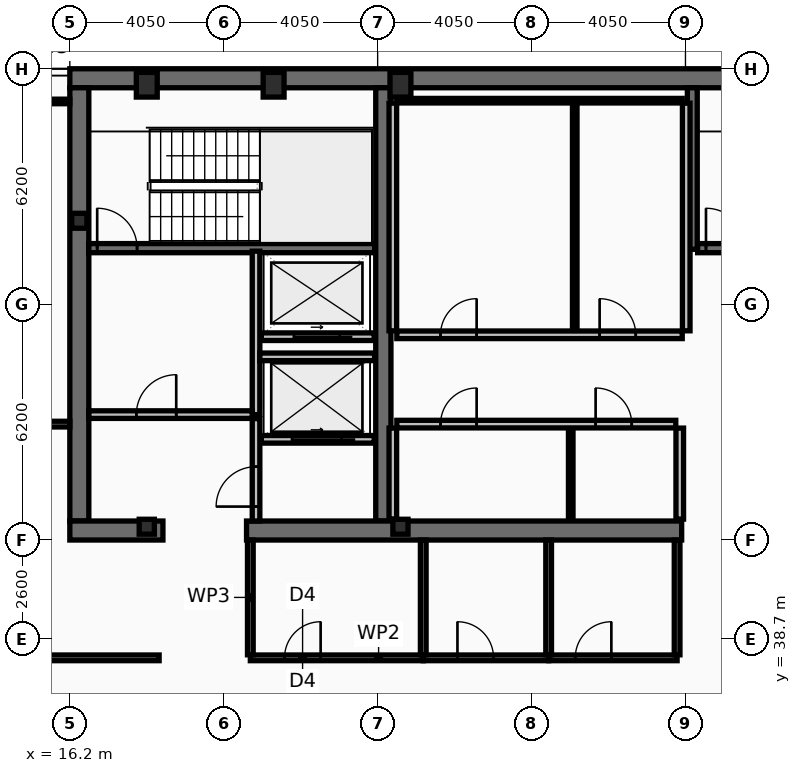
"""IFC4 building model, lengths in metres.
Left out: names, types, materials, properties, quantities, classifications, styles, units other than length and angle.
Written with IfcOpenShell. Run it as: python <this file> out.ifc"""

import sys

from ifc_helpers import new_model, si_unit, direction, frame, frame_2d, origin, origin_2d, place, context, subcontext, project, spatial, rectangle, hollow_rectangle, i_section, extrude, element, fill, save


model = new_model("IFC4")
c1 = context("Model", 3, precision=1e-05, world=origin(), true_north=direction((0.0, 1.0)))
c2 = subcontext(c1, "Body", "Model", "MODEL_VIEW")
j1 = project(units=[si_unit("LENGTHUNIT", "METRE"), si_unit("PLANEANGLEUNIT", "RADIAN")], contexts=[c1])
p1 = place(None, origin())
s1 = spatial("IfcSite", under=j1, at=p1, CompositionType="ELEMENT")
p2 = place(p1, origin())
s2 = spatial("IfcBuilding", under=s1, at=p2, CompositionType="ELEMENT")
p3 = place(p2, frame((0.0, 0.0, 329.0)))
s3 = spatial("IfcBuildingStorey", under=s2, at=p3, CompositionType="ELEMENT", Elevation=329.0)
p4 = place(p3, frame((16.2, 53.45, 0.0), z_axis=(0.0, 0.0, 1.0), x_axis=(1.0, 0.0, 0.0)))
e1 = element("IfcWall", 1, at=p4, inside=s3, PredefinedType="SHEAR", context=c2, shape_type="SweptSolid", body=[
    extrude(rectangle(XDim=40.5, YDim=0.5, at=frame_2d((20.25, 0.0))), origin(), (0.0, 0.0, 1.0), 3.44),
])
p5 = place(p3, frame((16.45, 41.8, 0.0), z_axis=(0.0, 0.0, 1.0), x_axis=(0.0, 1.0, 0.0)))
e2 = element("IfcWall", 2, at=p5, inside=s3, PredefinedType="SHEAR", context=c2, shape_type="SweptSolid", body=[
    extrude(rectangle(XDim=11.4, YDim=0.5, at=frame_2d((5.7, 0.0))), origin(), (0.0, 0.0, 1.0), 3.44),
])
p6 = place(p3, frame((24.45, 41.8, 0.0), z_axis=(0.0, 0.0, 1.0), x_axis=(0.0, 1.0, 0.0)))
e3 = element("IfcWall", 3, at=p6, inside=s3, PredefinedType="SHEAR", context=c2, shape_type="SweptSolid", body=[
    extrude(rectangle(XDim=11.4, YDim=0.4, at=frame_2d((5.7, 0.0))), origin(), (0.0, 0.0, 1.0), 3.44),
])
p7 = place(p3, frame((18.65, 41.55, 0.0), z_axis=(0.0, 0.0, 1.0), x_axis=(-1.0, 0.0, 0.0)))
e4 = element("IfcWall", 4, at=p7, inside=s3, PredefinedType="SHEAR", context=c2, shape_type="SweptSolid", body=[
    extrude(rectangle(XDim=2.45, YDim=0.5, at=frame_2d((1.225, 0.0))), origin(), (0.0, 0.0, 1.0), 3.44),
])
p8 = place(p3, frame((32.3, 41.55, 0.0), z_axis=(0.0, 0.0, 1.0), x_axis=(-1.0, 0.0, 0.0)))
e5 = element("IfcWall", 5, at=p8, inside=s3, PredefinedType="SHEAR", context=c2, shape_type="SweptSolid", body=[
    extrude(rectangle(XDim=11.45, YDim=0.5, at=frame_2d((5.725, 0.0))), origin(), (0.0, 0.0, 1.0), 3.44),
])
p9 = place(p3, frame((32.58, 48.95, 0.0), z_axis=(0.0, 0.0, 1.0), x_axis=(0.0, 1.0, 0.0)))
e6 = element("IfcWall", 6, at=p9, inside=s3, PredefinedType="SHEAR", context=c2, shape_type="SweptSolid", body=[
    extrude(rectangle(XDim=4.25, YDim=0.26, at=frame_2d((2.125, 0.0))), origin(), (0.0, 0.0, 1.0), 3.44),
])
p10 = place(p3, frame((16.7, 48.98, 0.0), z_axis=(0.0, 0.0, 1.0), x_axis=(1.0, 0.0, 0.0)))
e7 = element("IfcWall", 7, at=p10, inside=s3, PredefinedType="SHEAR", context=c2, shape_type="SweptSolid", body=[
    extrude(rectangle(XDim=7.52, YDim=0.24, at=frame_2d((3.76, 0.0))), origin(), (0.0, 0.0, 1.0), 3.44),
])
p11 = place(p10, frame((0.22, 0.0, 0.0)))
e8 = element("IfcOpeningElement", 8, at=p11, cuts=e7, PredefinedType="OPENING", context=c2, shape_type="SweptSolid", body=[
    extrude(rectangle(XDim=1.05, YDim=2.15, at=frame_2d((0.525, 1.075))), frame((0.0, 0.13, 0.0), z_axis=(0.0, -1.0, 0.0), x_axis=(1.0, 0.0, 0.0)), (0.0, 0.0, 1.0), 0.26),
])
p12 = place(p3, frame((32.72, 48.98, 0.0), z_axis=(0.0, 0.0, 1.0), x_axis=(1.0, 0.0, 0.0)))
e9 = element("IfcWall", 9, at=p12, inside=s3, PredefinedType="SHEAR", context=c2, shape_type="SweptSolid", body=[
    extrude(rectangle(XDim=7.56, YDim=0.24, at=frame_2d((3.78, 0.0))), origin(), (0.0, 0.0, 1.0), 3.44),
])
p13 = place(p12, frame((0.22, 0.0, 0.0)))
e10 = element("IfcOpeningElement", 10, at=p13, cuts=e9, PredefinedType="OPENING", context=c2, shape_type="SweptSolid", body=[
    extrude(rectangle(XDim=1.05, YDim=2.15, at=frame_2d((0.525, 1.075))), frame((0.0, 0.13, 0.0), z_axis=(0.0, -1.0, 0.0), x_axis=(1.0, 0.0, 0.0)), (0.0, 0.0, 1.0), 0.26),
])
for number, where, z_axis, x_axis in (
    (11, (18.225, 53.28, 0.0), (0.0, 0.0, 1.0), (1.0, 0.0, 0.0)),
    (12, (21.562, 53.28, 0.0), (0.0, 0.0, 1.0), (1.0, 0.0, 0.0)),
    (13, (24.9, 53.28, 0.0), (0.0, 0.0, 1.0), (1.0, 0.0, 0.0)),
):
    element("IfcColumn", number, at=place(p3, frame(where, z_axis=z_axis, x_axis=x_axis)), inside=s3, PredefinedType="COLUMN", context=c2, shape_type="SweptSolid", body=[
        extrude(hollow_rectangle(XDim=0.55, YDim=0.65, WallThickness=0.04, at=origin_2d()), origin(), (0.0, 0.0, 1.0), 3.6),
    ])
for number, where, z_axis, x_axis in (
    (14, (16.45, 49.7, 0.0), (0.0, 0.0, 1.0), (1.0, 0.0, 0.0)),
    (15, (18.225, 41.65, 0.0), (0.0, 0.0, 1.0), (1.0, 0.0, 0.0)),
    (16, (24.9, 41.65, 0.0), (0.0, 0.0, 1.0), (1.0, 0.0, 0.0)),
):
    element("IfcColumn", number, at=place(p3, frame(where, z_axis=z_axis, x_axis=x_axis)), inside=s3, PredefinedType="COLUMN", context=c2, shape_type="SweptSolid", body=[
        extrude(i_section(OverallWidth=0.399, OverallDepth=0.393, WebThickness=0.023, FlangeThickness=0.037, at=origin_2d()), origin(), (0.0, 0.0, 1.0), 3.6),
    ])
p14 = place(p3, frame((24.21, 43.95, 0.0), z_axis=(0.0, 0.0, 1.0), x_axis=(-1.0, 0.0, 0.0)))
e17 = element("IfcWall", 17, at=p14, inside=s3, PredefinedType="PARTITIONING", context=c2, shape_type="SweptSolid", body=[
    extrude(rectangle(XDim=2.97, YDim=0.2, at=frame_2d((1.485, 0.0))), origin(), (0.0, 0.0, 1.0), 3.44),
])
p15 = place(p14, frame((0.86, 0.0, 0.0)))
e18 = element("IfcOpeningElement", 18, at=p15, cuts=e17, PredefinedType="OPENING", context=c2, shape_type="SweptSolid", body=[
    extrude(rectangle(XDim=1.3, YDim=2.18, at=frame_2d((0.65, 1.09))), frame((0.0, 0.11, 0.0), z_axis=(0.0, -1.0, 0.0), x_axis=(1.0, 0.0, 0.0)), (0.0, 0.0, 1.0), 0.22),
])
p16 = place(p3, frame((24.21, 46.65, 0.0), z_axis=(0.0, 0.0, 1.0), x_axis=(-1.0, 0.0, 0.0)))
e19 = element("IfcWall", 19, at=p16, inside=s3, PredefinedType="PARTITIONING", context=c2, shape_type="SweptSolid", body=[
    extrude(rectangle(XDim=2.97, YDim=0.2, at=frame_2d((1.485, 0.0))), origin(), (0.0, 0.0, 1.0), 3.44),
])
p17 = place(p16, frame((0.91, 0.0, 0.0)))
e20 = element("IfcOpeningElement", 20, at=p17, cuts=e19, PredefinedType="OPENING", context=c2, shape_type="SweptSolid", body=[
    extrude(rectangle(XDim=1.2, YDim=2.18, at=frame_2d((0.6, 1.09))), frame((0.0, 0.11, 0.0), z_axis=(0.0, -1.0, 0.0), x_axis=(1.0, 0.0, 0.0)), (0.0, 0.0, 1.0), 0.22),
])
p18 = place(p3, frame((21.1, 44.6, 0.0), z_axis=(0.0, 0.0, 1.0), x_axis=(0.0, 1.0, 0.0)))
e21 = element("IfcWall", 21, at=p18, inside=s3, PredefinedType="PARTITIONING", context=c2, shape_type="SweptSolid", body=[
    extrude(rectangle(XDim=4.3, YDim=0.2, at=frame_2d((2.15, 0.0))), origin(), (0.0, 0.0, 1.0), 3.44),
])
p19 = place(p3, frame((16.7, 44.6, 0.0), z_axis=(0.0, 0.0, 1.0), x_axis=(1.0, 0.0, 0.0)))
e22 = element("IfcWall", 22, at=p19, inside=s3, PredefinedType="PARTITIONING", context=c2, shape_type="SweptSolid", body=[
    extrude(rectangle(XDim=4.3, YDim=0.2, at=frame_2d((2.15, 0.0))), origin(), (0.0, 0.0, 1.0), 3.44),
])
p20 = place(p19, frame((1.25, 0.0, 0.0)))
e23 = element("IfcOpeningElement", 23, at=p20, cuts=e22, PredefinedType="OPENING", context=c2, shape_type="SweptSolid", body=[
    extrude(rectangle(XDim=1.05, YDim=2.15, at=frame_2d((0.525, 1.075))), frame((0.0, 0.11, 0.0), z_axis=(0.0, -1.0, 0.0), x_axis=(1.0, 0.0, 0.0)), (0.0, 0.0, 1.0), 0.22),
])
p21 = place(p3, frame((21.2, 46.12, 0.0), z_axis=(0.0, 0.0, 1.0), x_axis=(1.0, 0.0, 0.0)))
e24 = element("IfcWall", 24, at=p21, inside=s3, PredefinedType="PARTITIONING", context=c2, shape_type="SweptSolid", body=[
    extrude(rectangle(XDim=3.02, YDim=0.2, at=frame_2d((1.51, 0.0))), origin(), (0.0, 0.0, 1.0), 3.44),
])
p22 = place(p3, frame((21.1, 41.8, 0.0), z_axis=(0.0, 0.0, 1.0), x_axis=(0.0, 1.0, 0.0)))
e25 = element("IfcWall", 25, at=p22, inside=s3, PredefinedType="PARTITIONING", context=c2, shape_type="SweptSolid", body=[
    extrude(rectangle(XDim=2.695, YDim=0.2, at=frame_2d((1.348, 0.0))), origin(), (0.0, 0.0, 1.0), 3.44),
])
p23 = place(p22, frame((0.38, 0.0, 0.0)))
e26 = element("IfcOpeningElement", 26, at=p23, cuts=e25, PredefinedType="OPENING", context=c2, shape_type="SweptSolid", body=[
    extrude(rectangle(XDim=1.05, YDim=2.15, at=frame_2d((0.525, 1.075))), frame((0.0, 0.11, 0.0), z_axis=(0.0, -1.0, 0.0), x_axis=(1.0, 0.0, 0.0)), (0.0, 0.0, 1.0), 0.22),
])
for number, where, z_axis, x_axis in (
    (27, (24.7, 46.805, 0.0), (0.0, 0.0, 1.0), (0.0, 1.0, 0.0)),
    (28, (32.42, 46.805, 0.0), (0.0, 0.0, 1.0), (0.0, 1.0, 0.0)),
):
    element("IfcWall", number, at=place(p3, frame(where, z_axis=z_axis, x_axis=x_axis)), inside=s3, PredefinedType="PARTITIONING", context=c2, shape_type="SweptSolid", body=[
        extrude(rectangle(XDim=5.99, YDim=0.2, at=frame_2d((2.995, 0.0))), origin(), (0.0, 0.0, 1.0), 3.44),
    ])
p24 = place(p3, frame((24.805, 52.86, 0.0), z_axis=(0.0, 0.0, 1.0), x_axis=(1.0, 0.0, 0.0)))
e29 = element("IfcWall", 29, at=p24, inside=s3, PredefinedType="PARTITIONING", context=c2, shape_type="SweptSolid", body=[
    extrude(rectangle(XDim=7.51, YDim=0.12, at=frame_2d((3.755, 0.0))), origin(), (0.0, 0.0, 1.0), 3.44),
])
p25 = place(p3, frame((29.486, 46.805, 0.0), z_axis=(0.0, 0.0, 1.0), x_axis=(0.0, 1.0, 0.0)))
e30 = element("IfcWall", 30, at=p25, inside=s3, PredefinedType="PARTITIONING", context=c2, shape_type="SweptSolid", body=[
    extrude(rectangle(XDim=5.99, YDim=0.12, at=frame_2d((2.995, 0.0))), origin(), (0.0, 0.0, 1.0), 3.44),
])
p26 = place(p3, frame((24.805, 46.7, 0.0), z_axis=(0.0, 0.0, 1.0), x_axis=(1.0, 0.0, 0.0)))
e31 = element("IfcWall", 31, at=p26, inside=s3, PredefinedType="PARTITIONING", context=c2, shape_type="SweptSolid", body=[
    extrude(rectangle(XDim=7.51, YDim=0.2, at=frame_2d((3.755, 0.0))), origin(), (0.0, 0.0, 1.0), 3.44),
])
p27 = place(p26, frame((1.15, 0.0, 0.0)))
e32 = element("IfcOpeningElement", 32, at=p27, cuts=e31, PredefinedType="OPENING", context=c2, shape_type="SweptSolid", body=[
    extrude(rectangle(XDim=0.95, YDim=2.1, at=frame_2d((0.475, 1.05))), frame((0.0, 0.11, 0.0), z_axis=(0.0, -1.0, 0.0), x_axis=(1.0, 0.0, 0.0)), (0.0, 0.0, 1.0), 0.22),
])
p28 = place(p26, frame((5.336, 0.0, 0.0)))
e33 = element("IfcOpeningElement", 33, at=p28, cuts=e31, PredefinedType="OPENING", context=c2, shape_type="SweptSolid", body=[
    extrude(rectangle(XDim=0.95, YDim=2.1, at=frame_2d((0.475, 1.05))), frame((0.0, 0.11, 0.0), z_axis=(0.0, -1.0, 0.0), x_axis=(1.0, 0.0, 0.0)), (0.0, 0.0, 1.0), 0.22),
])
for number, where, z_axis, x_axis in (
    (34, (24.7, 41.85, 0.0), (0.0, 0.0, 1.0), (0.0, 1.0, 0.0)),
    (35, (32.25, 41.85, 0.0), (0.0, 0.0, 1.0), (0.0, 1.0, 0.0)),
):
    element("IfcWall", number, at=place(p3, frame(where, z_axis=z_axis, x_axis=x_axis)), inside=s3, PredefinedType="PARTITIONING", context=c2, shape_type="SweptSolid", body=[
        extrude(rectangle(XDim=2.395, YDim=0.2, at=frame_2d((1.198, 0.0))), origin(), (0.0, 0.0, 1.0), 3.44),
    ])
p29 = place(p3, frame((29.381, 41.85, 0.0), z_axis=(0.0, 0.0, 1.0), x_axis=(0.0, 1.0, 0.0)))
e36 = element("IfcWall", 36, at=p29, inside=s3, PredefinedType="PARTITIONING", context=c2, shape_type="SweptSolid", body=[
    extrude(rectangle(XDim=2.395, YDim=0.12, at=frame_2d((1.198, 0.0))), origin(), (0.0, 0.0, 1.0), 3.44),
])
p30 = place(p3, frame((24.805, 44.35, 0.0), z_axis=(0.0, 0.0, 1.0), x_axis=(1.0, 0.0, 0.0)))
e37 = element("IfcWall", 37, at=p30, inside=s3, PredefinedType="PARTITIONING", context=c2, shape_type="SweptSolid", body=[
    extrude(rectangle(XDim=7.34, YDim=0.2, at=frame_2d((3.67, 0.0))), origin(), (0.0, 0.0, 1.0), 3.44),
])
p31 = place(p30, frame((1.15, 0.0, 0.0)))
e38 = element("IfcOpeningElement", 38, at=p31, cuts=e37, PredefinedType="OPENING", context=c2, shape_type="SweptSolid", body=[
    extrude(rectangle(XDim=0.95, YDim=2.1, at=frame_2d((0.475, 1.05))), frame((0.0, 0.11, 0.0), z_axis=(0.0, -1.0, 0.0), x_axis=(1.0, 0.0, 0.0)), (0.0, 0.0, 1.0), 0.22),
])
p32 = place(p30, frame((5.231, 0.0, 0.0)))
e39 = element("IfcOpeningElement", 39, at=p32, cuts=e37, PredefinedType="OPENING", context=c2, shape_type="SweptSolid", body=[
    extrude(rectangle(XDim=0.95, YDim=2.1, at=frame_2d((0.475, 1.05))), frame((0.0, 0.11, 0.0), z_axis=(0.0, -1.0, 0.0), x_axis=(1.0, 0.0, 0.0)), (0.0, 0.0, 1.0), 0.22),
])
p33 = place(p3, frame((20.95, 38.2, 0.0), z_axis=(0.0, 0.0, 1.0), x_axis=(1.0, 0.0, 0.0)))
e40 = element("IfcWall", 40, at=p33, inside=s3, PredefinedType="PARTITIONING", context=c2, shape_type="SweptSolid", body=[
    extrude(rectangle(XDim=4.55, YDim=0.15, at=frame_2d((2.275, 0.0))), origin(), (0.0, 0.0, 1.0), 2.83),
])
p34 = place(p33, frame((0.9, 0.0, 0.0)))
e41 = element("IfcOpeningElement", 41, at=p34, cuts=e40, PredefinedType="OPENING", context=c2, shape_type="SweptSolid", body=[
    extrude(rectangle(XDim=0.95, YDim=2.05, at=frame_2d((0.475, 1.025))), frame((0.0, 0.085, 0.0), z_axis=(0.0, -1.0, 0.0), x_axis=(1.0, 0.0, 0.0)), (0.0, 0.0, 1.0), 0.17),
])
p35 = place(p3, frame((25.5, 38.2, 0.0), z_axis=(0.0, 0.0, 1.0), x_axis=(1.0, 0.0, 0.0)))
e42 = element("IfcWall", 42, at=p35, inside=s3, PredefinedType="PARTITIONING", context=c2, shape_type="SweptSolid", body=[
    extrude(rectangle(XDim=3.3, YDim=0.15, at=frame_2d((1.65, 0.0))), origin(), (0.0, 0.0, 1.0), 3.44),
])
p36 = place(p35, frame((0.9, 0.0, 0.0)))
e43 = element("IfcOpeningElement", 43, at=p36, cuts=e42, PredefinedType="OPENING", context=c2, shape_type="SweptSolid", body=[
    extrude(rectangle(XDim=0.95, YDim=2.05, at=frame_2d((0.475, 1.025))), frame((0.0, 0.085, 0.0), z_axis=(0.0, -1.0, 0.0), x_axis=(1.0, 0.0, 0.0)), (0.0, 0.0, 1.0), 0.17),
])
p37 = place(p3, frame((28.8, 38.2, 0.0), z_axis=(0.0, 0.0, 1.0), x_axis=(1.0, 0.0, 0.0)))
e44 = element("IfcWall", 44, at=p37, inside=s3, PredefinedType="PARTITIONING", context=c2, shape_type="SweptSolid", body=[
    extrude(rectangle(XDim=3.38, YDim=0.15, at=frame_2d((1.69, 0.0))), origin(), (0.0, 0.0, 1.0), 3.44),
])
p38 = place(p37, frame((0.7, 0.0, 0.0)))
e45 = element("IfcOpeningElement", 45, at=p38, cuts=e44, PredefinedType="OPENING", context=c2, shape_type="SweptSolid", body=[
    extrude(rectangle(XDim=0.95, YDim=2.05, at=frame_2d((0.475, 1.025))), frame((0.0, 0.085, 0.0), z_axis=(0.0, -1.0, 0.0), x_axis=(1.0, 0.0, 0.0)), (0.0, 0.0, 1.0), 0.17),
])
for number, where, z_axis, x_axis in (
    (46, (20.95, 38.28, 0.0), (0.0, 0.0, 1.0), (0.0, 1.0, 0.0)),
    (47, (25.5, 38.28, 0.0), (0.0, 0.0, 1.0), (0.0, 1.0, 0.0)),
    (48, (28.8, 38.28, 0.0), (0.0, 0.0, 1.0), (0.0, 1.0, 0.0)),
    (49, (32.18, 38.28, 0.0), (0.0, 0.0, 1.0), (0.0, 1.0, 0.0)),
):
    element("IfcWall", number, at=place(p3, frame(where, z_axis=z_axis, x_axis=x_axis)), inside=s3, PredefinedType="PARTITIONING", context=c2, shape_type="SweptSolid", body=[
        extrude(rectangle(XDim=3.02, YDim=0.15, at=frame_2d((1.51, 0.0))), origin(), (0.0, 0.0, 1.0), 3.44),
    ])
p39 = place(p3, frame((12.03, 38.2, 0.0), z_axis=(0.0, 0.0, 1.0), x_axis=(1.0, 0.0, 0.0)))
e50 = element("IfcWall", 50, at=p39, inside=s3, PredefinedType="PARTITIONING", context=c2, shape_type="SweptSolid", body=[
    extrude(rectangle(XDim=6.52, YDim=0.15, at=frame_2d((3.26, 0.0))), origin(), (0.0, 0.0, 1.0), 2.83),
])
p40 = place(p39, frame((2.32, 0.0, 0.0)))
e51 = element("IfcOpeningElement", 51, at=p40, cuts=e50, PredefinedType="OPENING", context=c2, shape_type="SweptSolid", body=[
    extrude(rectangle(XDim=0.95, YDim=2.05, at=frame_2d((0.475, 1.025))), frame((0.0, 0.085, 0.0), z_axis=(0.0, -1.0, 0.0), x_axis=(1.0, 0.0, 0.0)), (0.0, 0.0, 1.0), 0.17),
])
p41 = place(p3, frame((12.095, 44.35, 0.0), z_axis=(0.0, 0.0, 1.0), x_axis=(1.0, 0.0, 0.0)))
e52 = element("IfcWall", 52, at=p41, inside=s3, PredefinedType="PARTITIONING", context=c2, shape_type="SweptSolid", body=[
    extrude(rectangle(XDim=4.105, YDim=0.15, at=frame_2d((2.052, 0.0))), origin(), (0.0, 0.0, 1.0), 2.88),
])
p42 = place(p41, frame((2.32, 0.0, 0.0)))
e53 = element("IfcOpeningElement", 53, at=p42, cuts=e52, PredefinedType="OPENING", context=c2, shape_type="SweptSolid", body=[
    extrude(rectangle(XDim=0.9, YDim=2.05, at=frame_2d((0.45, 1.025))), frame((0.0, 0.085, 0.0), z_axis=(0.0, -1.0, 0.0), x_axis=(1.0, 0.0, 0.0)), (0.0, 0.0, 1.0), 0.17),
])
p43 = place(p3, frame((12.095, 52.84, 0.0), z_axis=(0.0, 0.0, 1.0), x_axis=(1.0, 0.0, 0.0)))
e54 = element("IfcWall", 54, at=p43, inside=s3, PredefinedType="PARTITIONING", context=c2, shape_type="SweptSolid", body=[
    extrude(rectangle(XDim=4.105, YDim=0.12, at=frame_2d((2.052, 0.0))), origin(), (0.0, 0.0, 1.0), 3.44),
])
p44 = place(p11, origin())
e55 = element("IfcDoor", 55, at=p44, inside=s3, OperationType="SINGLE_SWING_LEFT", PredefinedType="DOOR", context=c2, shape_type="SweptSolid", body=[
    extrude(rectangle(XDim=1.05, YDim=2.15, at=frame_2d((0.525, 1.075))), frame((0.0, 0.025, 0.0), z_axis=(0.0, -1.0, 0.0), x_axis=(1.0, 0.0, 0.0)), (0.0, 0.0, 1.0), 0.05),
])
fill(e8, e55)
p45 = place(p13, origin())
e56 = element("IfcDoor", 56, at=p45, inside=s3, OperationType="SINGLE_SWING_LEFT", PredefinedType="DOOR", context=c2, shape_type="SweptSolid", body=[
    extrude(rectangle(XDim=1.05, YDim=2.15, at=frame_2d((0.525, 1.075))), frame((0.0, 0.025, 0.0), z_axis=(0.0, -1.0, 0.0), x_axis=(1.0, 0.0, 0.0)), (0.0, 0.0, 1.0), 0.05),
])
fill(e10, e56)
p46 = place(p15, origin())
e57 = element("IfcDoor", 57, at=p46, inside=s3, OperationType="SLIDING_TO_LEFT", PredefinedType="DOOR", context=c2, shape_type="SweptSolid", body=[
    extrude(rectangle(XDim=1.3, YDim=2.18, at=frame_2d((0.65, 1.09))), frame((0.0, 0.025, 0.0), z_axis=(0.0, -1.0, 0.0), x_axis=(1.0, 0.0, 0.0)), (0.0, 0.0, 1.0), 0.05),
])
fill(e18, e57)
p47 = place(p17, origin())
e58 = element("IfcDoor", 58, at=p47, inside=s3, OperationType="SLIDING_TO_LEFT", PredefinedType="DOOR", context=c2, shape_type="SweptSolid", body=[
    extrude(rectangle(XDim=1.2, YDim=2.18, at=frame_2d((0.6, 1.09))), frame((0.0, 0.025, 0.0), z_axis=(0.0, -1.0, 0.0), x_axis=(1.0, 0.0, 0.0)), (0.0, 0.0, 1.0), 0.05),
])
fill(e20, e58)
p48 = place(p20, origin())
e59 = element("IfcDoor", 59, at=p48, inside=s3, OperationType="SINGLE_SWING_RIGHT", PredefinedType="DOOR", context=c2, shape_type="SweptSolid", body=[
    extrude(rectangle(XDim=1.05, YDim=2.15, at=frame_2d((0.525, 1.075))), frame((0.0, 0.025, 0.0), z_axis=(0.0, -1.0, 0.0), x_axis=(1.0, 0.0, 0.0)), (0.0, 0.0, 1.0), 0.05),
])
fill(e23, e59)
p49 = place(p23, origin())
e60 = element("IfcDoor", 60, at=p49, inside=s3, OperationType="SINGLE_SWING_LEFT", PredefinedType="DOOR", context=c2, shape_type="SweptSolid", body=[
    extrude(rectangle(XDim=1.05, YDim=2.15, at=frame_2d((0.525, 1.075))), frame((0.0, 0.025, 0.0), z_axis=(0.0, -1.0, 0.0), x_axis=(1.0, 0.0, 0.0)), (0.0, 0.0, 1.0), 0.05),
])
fill(e26, e60)
p50 = place(p27, origin())
e61 = element("IfcDoor", 61, at=p50, inside=s3, OperationType="SINGLE_SWING_RIGHT", PredefinedType="DOOR", context=c2, shape_type="SweptSolid", body=[
    extrude(rectangle(XDim=0.95, YDim=2.1, at=frame_2d((0.475, 1.05))), frame((0.0, 0.025, 0.0), z_axis=(0.0, -1.0, 0.0), x_axis=(1.0, 0.0, 0.0)), (0.0, 0.0, 1.0), 0.05),
])
fill(e32, e61)
p51 = place(p28, origin())
e62 = element("IfcDoor", 62, at=p51, inside=s3, OperationType="SINGLE_SWING_LEFT", PredefinedType="DOOR", context=c2, shape_type="SweptSolid", body=[
    extrude(rectangle(XDim=0.95, YDim=2.1, at=frame_2d((0.475, 1.05))), frame((0.0, 0.025, 0.0), z_axis=(0.0, -1.0, 0.0), x_axis=(1.0, 0.0, 0.0)), (0.0, 0.0, 1.0), 0.05),
])
fill(e33, e62)
p52 = place(p31, origin())
e63 = element("IfcDoor", 63, at=p52, inside=s3, OperationType="SINGLE_SWING_RIGHT", PredefinedType="DOOR", context=c2, shape_type="SweptSolid", body=[
    extrude(rectangle(XDim=0.95, YDim=2.1, at=frame_2d((0.475, 1.05))), frame((0.0, 0.025, 0.0), z_axis=(0.0, -1.0, 0.0), x_axis=(1.0, 0.0, 0.0)), (0.0, 0.0, 1.0), 0.05),
])
fill(e38, e63)
p53 = place(p32, origin())
e64 = element("IfcDoor", 64, at=p53, inside=s3, OperationType="SINGLE_SWING_LEFT", PredefinedType="DOOR", context=c2, shape_type="SweptSolid", body=[
    extrude(rectangle(XDim=0.95, YDim=2.1, at=frame_2d((0.475, 1.05))), frame((0.0, 0.025, 0.0), z_axis=(0.0, -1.0, 0.0), x_axis=(1.0, 0.0, 0.0)), (0.0, 0.0, 1.0), 0.05),
])
fill(e39, e64)
p54 = place(p34, origin())
e65 = element("IfcDoor", 65, at=p54, inside=s3, OperationType="SINGLE_SWING_RIGHT", PredefinedType="DOOR", context=c2, shape_type="SweptSolid", body=[
    extrude(rectangle(XDim=0.95, YDim=2.05, at=frame_2d((0.475, 1.025))), frame((0.0, 0.025, 0.0), z_axis=(0.0, -1.0, 0.0), x_axis=(1.0, 0.0, 0.0)), (0.0, 0.0, 1.0), 0.05),
])
fill(e41, e65)
p55 = place(p36, origin())
e66 = element("IfcDoor", 66, at=p55, inside=s3, OperationType="SINGLE_SWING_LEFT", PredefinedType="DOOR", context=c2, shape_type="SweptSolid", body=[
    extrude(rectangle(XDim=0.95, YDim=2.05, at=frame_2d((0.475, 1.025))), frame((0.0, 0.025, 0.0), z_axis=(0.0, -1.0, 0.0), x_axis=(1.0, 0.0, 0.0)), (0.0, 0.0, 1.0), 0.05),
])
fill(e43, e66)
p56 = place(p38, origin())
e67 = element("IfcDoor", 67, at=p56, inside=s3, OperationType="SINGLE_SWING_RIGHT", PredefinedType="DOOR", context=c2, shape_type="SweptSolid", body=[
    extrude(rectangle(XDim=0.95, YDim=2.05, at=frame_2d((0.475, 1.025))), frame((0.0, 0.025, 0.0), z_axis=(0.0, -1.0, 0.0), x_axis=(1.0, 0.0, 0.0)), (0.0, 0.0, 1.0), 0.05),
])
fill(e45, e67)
save(model, sys.argv[1])
